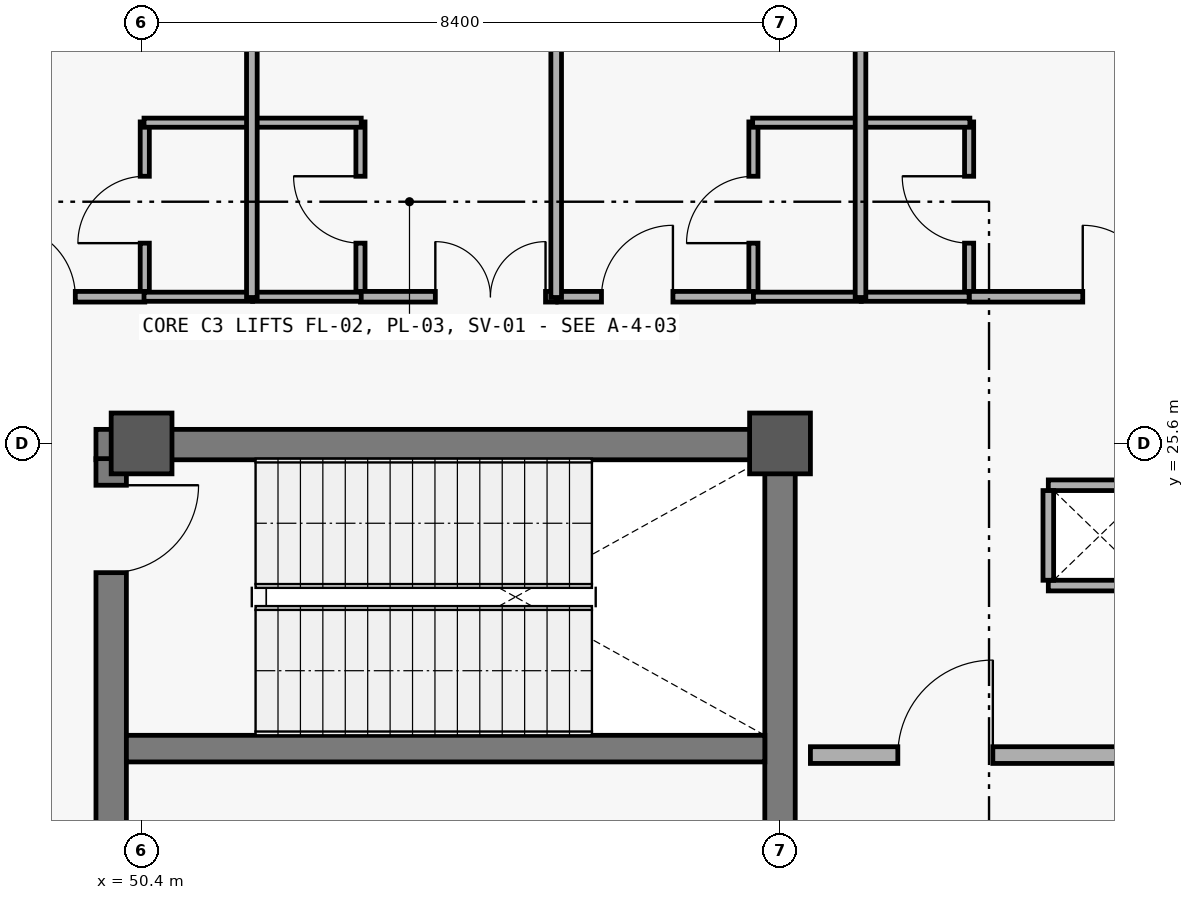
"""IFC4 building model, lengths in metres.
Left out: names, types, materials, properties, quantities, classifications, styles, units other than length and angle.
Written with IfcOpenShell. Run it as: python <this file> out.ifc"""

import sys

from ifc_helpers import new_model, si_unit, direction, frame, frame_2d, origin, origin_2d, place, context, subcontext, project, spatial, rectangle, extrude, element, fill, save


model = new_model("IFC4")
c1 = context("Model", 3, precision=1e-05, world=origin(), true_north=direction((0.0, 1.0)))
c2 = subcontext(c1, "Body", "Model", "MODEL_VIEW")
j1 = project(units=[si_unit("LENGTHUNIT", "METRE"), si_unit("PLANEANGLEUNIT", "RADIAN")], contexts=[c1])
p1 = place(None, origin())
s1 = spatial("IfcSite", under=j1, at=p1, CompositionType="ELEMENT")
p2 = place(p1, origin())
s2 = spatial("IfcBuilding", under=s1, at=p2, CompositionType="ELEMENT")
p3 = place(p2, frame((0.0, 0.0, 5.4)))
s3 = spatial("IfcBuildingStorey", under=s2, at=p3, CompositionType="ELEMENT", Elevation=5.4)
for number, where, z_axis, x_axis in (
    (1, (50.4, 25.6, 0.0), (0.0, 0.0, 1.0), (1.0, 0.0, 0.0)),
    (2, (58.8, 25.6, 0.0), (0.0, 0.0, 1.0), (1.0, 0.0, 0.0)),
):
    element("IfcColumn", number, at=place(p3, frame(where, z_axis=z_axis, x_axis=x_axis)), inside=s3, PredefinedType="COLUMN", context=c2, shape_type="SweptSolid", body=[
        extrude(rectangle(XDim=0.8, YDim=0.8, at=origin_2d()), origin(), (0.0, 0.0, 1.0), 5.4),
    ])
p4 = place(p3, frame((59.0, 25.585, 0.0), z_axis=(0.0, 0.0, 1.0), x_axis=(-1.0, 0.0, 0.0)))
e3 = element("IfcWall", 3, at=p4, inside=s3, PredefinedType="SHEAR", context=c2, shape_type="SweptSolid", body=[
    extrude(rectangle(XDim=9.2, YDim=0.4, at=frame_2d((4.6, 0.0))), origin(), (0.0, 0.0, 1.0), 5.08),
])
p5 = place(p3, frame((50.0, 25.4, 0.0), z_axis=(0.0, 0.0, 1.0), x_axis=(0.0, -1.0, 0.0)))
e4 = element("IfcWall", 4, at=p5, inside=s3, PredefinedType="SHEAR", context=c2, shape_type="SweptSolid", body=[
    extrude(rectangle(XDim=7.4, YDim=0.4, at=frame_2d((3.7, 0.0))), origin(), (0.0, 0.0, 1.0), 5.08),
])
p6 = place(p5, frame((0.35, 0.0, 0.0)))
e5 = element("IfcOpeningElement", 5, at=p6, cuts=e4, PredefinedType="OPENING", context=c2, shape_type="SweptSolid", body=[
    extrude(rectangle(XDim=1.15, YDim=2.2, at=frame_2d((0.575, 1.1))), frame((0.0, 0.21, 0.0), z_axis=(0.0, -1.0, 0.0), x_axis=(1.0, 0.0, 0.0)), (0.0, 0.0, 1.0), 0.42),
])
p7 = place(p3, frame((58.8, 18.0, 0.0), z_axis=(0.0, 0.0, 1.0), x_axis=(0.0, 1.0, 0.0)))
e6 = element("IfcWall", 6, at=p7, inside=s3, PredefinedType="SHEAR", context=c2, shape_type="SweptSolid", body=[
    extrude(rectangle(XDim=7.4, YDim=0.4, at=frame_2d((3.7, 0.0))), origin(), (0.0, 0.0, 1.0), 5.08),
])
p8 = place(p3, frame((50.2, 21.585, 0.0), z_axis=(0.0, 0.0, 1.0), x_axis=(1.0, 0.0, 0.0)))
e7 = element("IfcWall", 7, at=p8, inside=s3, PredefinedType="SHEAR", context=c2, shape_type="SweptSolid", body=[
    extrude(rectangle(XDim=8.4, YDim=0.35, at=frame_2d((4.2, 0.0))), origin(), (0.0, 0.0, 1.0), 5.08),
])
p9 = place(p3, frame((59.2, 21.5, 0.0), z_axis=(0.0, 0.0, 1.0), x_axis=(1.0, 0.0, 0.0)))
e8 = element("IfcWall", 8, at=p9, inside=s3, PredefinedType="SOLIDWALL", context=c2, shape_type="SweptSolid", body=[
    extrude(rectangle(XDim=4.8, YDim=0.22, at=frame_2d((2.4, 0.0))), origin(), (0.0, 0.0, 1.0), 4.23),
])
p10 = place(p9, frame((1.15, 0.0, 0.0)))
e9 = element("IfcOpeningElement", 9, at=p10, cuts=e8, PredefinedType="OPENING", context=c2, shape_type="SweptSolid", body=[
    extrude(rectangle(XDim=1.25, YDim=2.2, at=frame_2d((0.625, 1.1))), frame((0.0, 0.12, 0.0), z_axis=(0.0, -1.0, 0.0), x_axis=(1.0, 0.0, 0.0)), (0.0, 0.0, 1.0), 0.24),
])
p11 = place(p3, frame((50.442, 27.52, 0.0), z_axis=(0.0, 0.0, 1.0), x_axis=(0.0, 1.0, 0.0)))
e10 = element("IfcWall", 10, at=p11, inside=s3, PredefinedType="PARTITIONING", context=c2, shape_type="SweptSolid", body=[
    extrude(rectangle(XDim=2.31, YDim=0.12, at=frame_2d((1.155, 0.0))), origin(), (0.0, 0.0, 1.0), 4.18),
])
p12 = place(p11, frame((0.715, 0.0, 0.0)))
e11 = element("IfcOpeningElement", 11, at=p12, cuts=e10, PredefinedType="OPENING", context=c2, shape_type="SweptSolid", body=[
    extrude(rectangle(XDim=0.88, YDim=2.15, at=frame_2d((0.44, 1.075))), frame((0.0, 0.07, 0.0), z_axis=(0.0, -1.0, 0.0), x_axis=(1.0, 0.0, 0.0)), (0.0, 0.0, 1.0), 0.14),
])
p13 = place(p3, frame((53.28, 27.52, 0.0), z_axis=(0.0, 0.0, 1.0), x_axis=(0.0, 1.0, 0.0)))
e12 = element("IfcWall", 12, at=p13, inside=s3, PredefinedType="PARTITIONING", context=c2, shape_type="SweptSolid", body=[
    extrude(rectangle(XDim=2.31, YDim=0.12, at=frame_2d((1.155, 0.0))), origin(), (0.0, 0.0, 1.0), 4.18),
])
p14 = place(p13, frame((0.715, 0.0, 0.0)))
e13 = element("IfcOpeningElement", 13, at=p14, cuts=e12, PredefinedType="OPENING", context=c2, shape_type="SweptSolid", body=[
    extrude(rectangle(XDim=0.88, YDim=2.15, at=frame_2d((0.44, 1.075))), frame((0.0, 0.07, 0.0), z_axis=(0.0, -1.0, 0.0), x_axis=(1.0, 0.0, 0.0)), (0.0, 0.0, 1.0), 0.14),
])
p15 = place(p3, frame((58.45, 27.52, 0.0), z_axis=(0.0, 0.0, 1.0), x_axis=(0.0, 1.0, 0.0)))
e14 = element("IfcWall", 14, at=p15, inside=s3, PredefinedType="PARTITIONING", context=c2, shape_type="SweptSolid", body=[
    extrude(rectangle(XDim=2.31, YDim=0.12, at=frame_2d((1.155, 0.0))), origin(), (0.0, 0.0, 1.0), 4.18),
])
p16 = place(p15, frame((0.715, 0.0, 0.0)))
e15 = element("IfcOpeningElement", 15, at=p16, cuts=e14, PredefinedType="OPENING", context=c2, shape_type="SweptSolid", body=[
    extrude(rectangle(XDim=0.88, YDim=2.15, at=frame_2d((0.44, 1.075))), frame((0.0, 0.07, 0.0), z_axis=(0.0, -1.0, 0.0), x_axis=(1.0, 0.0, 0.0)), (0.0, 0.0, 1.0), 0.14),
])
p17 = place(p3, frame((61.288, 27.52, 0.0), z_axis=(0.0, 0.0, 1.0), x_axis=(0.0, 1.0, 0.0)))
e16 = element("IfcWall", 16, at=p17, inside=s3, PredefinedType="PARTITIONING", context=c2, shape_type="SweptSolid", body=[
    extrude(rectangle(XDim=2.31, YDim=0.12, at=frame_2d((1.155, 0.0))), origin(), (0.0, 0.0, 1.0), 4.18),
])
p18 = place(p17, frame((0.715, 0.0, 0.0)))
e17 = element("IfcOpeningElement", 17, at=p18, cuts=e16, PredefinedType="OPENING", context=c2, shape_type="SweptSolid", body=[
    extrude(rectangle(XDim=0.88, YDim=2.15, at=frame_2d((0.44, 1.075))), frame((0.0, 0.07, 0.0), z_axis=(0.0, -1.0, 0.0), x_axis=(1.0, 0.0, 0.0)), (0.0, 0.0, 1.0), 0.14),
])
p19 = place(p3, frame((47.867, 27.53, 0.0), z_axis=(0.0, 0.0, 1.0), x_axis=(1.0, 0.0, 0.0)))
e18 = element("IfcWall", 18, at=p19, inside=s3, PredefinedType="PARTITIONING", context=c2, shape_type="SweptSolid", body=[
    extrude(rectangle(XDim=2.575, YDim=0.14, at=frame_2d((1.288, 0.0))), origin(), (0.0, 0.0, 1.0), 4.18),
])
p20 = place(p19, frame((0.721, 0.0, 0.0)))
e19 = element("IfcOpeningElement", 19, at=p20, cuts=e18, PredefinedType="OPENING", context=c2, shape_type="SweptSolid", body=[
    extrude(rectangle(XDim=0.94, YDim=2.2, at=frame_2d((0.47, 1.1))), frame((0.0, 0.08, 0.0), z_axis=(0.0, -1.0, 0.0), x_axis=(1.0, 0.0, 0.0)), (0.0, 0.0, 1.0), 0.16),
])
p21 = place(p3, frame((53.28, 27.53, 0.0), z_axis=(0.0, 0.0, 1.0), x_axis=(1.0, 0.0, 0.0)))
e20 = element("IfcWall", 20, at=p21, inside=s3, PredefinedType="PARTITIONING", context=c2, shape_type="SweptSolid", body=[
    extrude(rectangle(XDim=2.575, YDim=0.14, at=frame_2d((1.288, 0.0))), origin(), (0.0, 0.0, 1.0), 4.18),
])
p22 = place(p21, frame((0.985, 0.0, 0.0)))
e21 = element("IfcOpeningElement", 21, at=p22, cuts=e20, PredefinedType="OPENING", context=c2, shape_type="SweptSolid", body=[
    extrude(rectangle(XDim=1.45, YDim=2.3, at=frame_2d((0.725, 1.15))), frame((0.0, 0.08, 0.0), z_axis=(0.0, -1.0, 0.0), x_axis=(1.0, 0.0, 0.0)), (0.0, 0.0, 1.0), 0.16),
])
p23 = place(p3, frame((55.875, 27.53, 0.0), z_axis=(0.0, 0.0, 1.0), x_axis=(1.0, 0.0, 0.0)))
e22 = element("IfcWall", 22, at=p23, inside=s3, PredefinedType="PARTITIONING", context=c2, shape_type="SweptSolid", body=[
    extrude(rectangle(XDim=2.575, YDim=0.14, at=frame_2d((1.288, 0.0))), origin(), (0.0, 0.0, 1.0), 4.18),
])
p24 = place(p23, frame((0.576, 0.0, 0.0)))
e23 = element("IfcOpeningElement", 23, at=p24, cuts=e22, PredefinedType="OPENING", context=c2, shape_type="SweptSolid", body=[
    extrude(rectangle(XDim=0.94, YDim=2.2, at=frame_2d((0.47, 1.1))), frame((0.0, 0.08, 0.0), z_axis=(0.0, -1.0, 0.0), x_axis=(1.0, 0.0, 0.0)), (0.0, 0.0, 1.0), 0.16),
])
p25 = place(p3, frame((61.288, 27.53, 0.0), z_axis=(0.0, 0.0, 1.0), x_axis=(1.0, 0.0, 0.0)))
e24 = element("IfcWall", 24, at=p25, inside=s3, PredefinedType="PARTITIONING", context=c2, shape_type="SweptSolid", body=[
    extrude(rectangle(XDim=2.575, YDim=0.14, at=frame_2d((1.288, 0.0))), origin(), (0.0, 0.0, 1.0), 4.18),
])
p26 = place(p25, frame((1.495, 0.0, 0.0)))
e25 = element("IfcOpeningElement", 25, at=p26, cuts=e24, PredefinedType="OPENING", context=c2, shape_type="SweptSolid", body=[
    extrude(rectangle(XDim=0.94, YDim=2.2, at=frame_2d((0.47, 1.1))), frame((0.0, 0.08, 0.0), z_axis=(0.0, -1.0, 0.0), x_axis=(1.0, 0.0, 0.0)), (0.0, 0.0, 1.0), 0.16),
])
for number, where, z_axis, x_axis in (
    (26, (50.432, 27.53, 0.0), (0.0, 0.0, 1.0), (1.0, 0.0, 0.0)),
    (27, (50.432, 29.82, 0.0), (0.0, 0.0, 1.0), (1.0, 0.0, 0.0)),
):
    element("IfcWall", number, at=place(p3, frame(where, z_axis=z_axis, x_axis=x_axis)), inside=s3, PredefinedType="PARTITIONING", context=c2, shape_type="SweptSolid", body=[
        extrude(rectangle(XDim=1.429, YDim=0.12, at=frame_2d((0.715, 0.0))), origin(), (0.0, 0.0, 1.0), 4.18),
    ])
for number, where, z_axis, x_axis in (
    (28, (51.861, 27.53, 0.0), (0.0, 0.0, 1.0), (1.0, 0.0, 0.0)),
    (29, (51.861, 29.82, 0.0), (0.0, 0.0, 1.0), (1.0, 0.0, 0.0)),
):
    element("IfcWall", number, at=place(p3, frame(where, z_axis=z_axis, x_axis=x_axis)), inside=s3, PredefinedType="PARTITIONING", context=c2, shape_type="SweptSolid", body=[
        extrude(rectangle(XDim=1.429, YDim=0.12, at=frame_2d((0.714, 0.0))), origin(), (0.0, 0.0, 1.0), 4.18),
    ])
p27 = place(p3, frame((58.45, 27.53, 0.0), z_axis=(0.0, 0.0, 1.0), x_axis=(1.0, 0.0, 0.0)))
e30 = element("IfcWall", 30, at=p27, inside=s3, PredefinedType="PARTITIONING", context=c2, shape_type="SweptSolid", body=[
    extrude(rectangle(XDim=1.419, YDim=0.12, at=frame_2d((0.709, 0.0))), origin(), (0.0, 0.0, 1.0), 4.18),
])
p28 = place(p3, frame((58.44, 29.82, 0.0), z_axis=(0.0, 0.0, 1.0), x_axis=(1.0, 0.0, 0.0)))
e31 = element("IfcWall", 31, at=p28, inside=s3, PredefinedType="PARTITIONING", context=c2, shape_type="SweptSolid", body=[
    extrude(rectangle(XDim=1.429, YDim=0.12, at=frame_2d((0.714, 0.0))), origin(), (0.0, 0.0, 1.0), 4.18),
])
p29 = place(p3, frame((59.869, 27.53, 0.0), z_axis=(0.0, 0.0, 1.0), x_axis=(1.0, 0.0, 0.0)))
e32 = element("IfcWall", 32, at=p29, inside=s3, PredefinedType="PARTITIONING", context=c2, shape_type="SweptSolid", body=[
    extrude(rectangle(XDim=1.419, YDim=0.12, at=frame_2d((0.709, 0.0))), origin(), (0.0, 0.0, 1.0), 4.18),
])
p30 = place(p3, frame((59.869, 29.82, 0.0), z_axis=(0.0, 0.0, 1.0), x_axis=(1.0, 0.0, 0.0)))
e33 = element("IfcWall", 33, at=p30, inside=s3, PredefinedType="PARTITIONING", context=c2, shape_type="SweptSolid", body=[
    extrude(rectangle(XDim=1.429, YDim=0.12, at=frame_2d((0.715, 0.0))), origin(), (0.0, 0.0, 1.0), 4.18),
])
for number, where, z_axis, x_axis in (
    (34, (51.851, 27.52, 0.0), (0.0, 0.0, 1.0), (0.0, 1.0, 0.0)),
    (35, (55.855, 27.52, 0.0), (0.0, 0.0, 1.0), (0.0, 1.0, 0.0)),
    (36, (59.859, 27.52, 0.0), (0.0, 0.0, 1.0), (0.0, 1.0, 0.0)),
):
    element("IfcWall", number, at=place(p3, frame(where, z_axis=z_axis, x_axis=x_axis)), inside=s3, PredefinedType="PARTITIONING", context=c2, shape_type="SweptSolid", body=[
        extrude(rectangle(XDim=6.14, YDim=0.14, at=frame_2d((3.07, 0.0))), origin(), (0.0, 0.0, 1.0), 4.18),
    ])
for number, where, z_axis, x_axis in (
    (37, (62.33, 23.73, 0.0), (0.0, 0.0, 1.0), (1.0, 0.0, 0.0)),
    (38, (63.69, 25.05, 0.0), (0.0, 0.0, 1.0), (-1.0, 0.0, 0.0)),
):
    element("IfcWall", number, at=place(p3, frame(where, z_axis=z_axis, x_axis=x_axis)), inside=s3, PredefinedType="PARTITIONING", context=c2, shape_type="SweptSolid", body=[
        extrude(rectangle(XDim=1.36, YDim=0.14, at=frame_2d((0.68, 0.0))), origin(), (0.0, 0.0, 1.0), 4.2),
    ])
p31 = place(p3, frame((62.33, 24.98, 0.0), z_axis=(0.0, 0.0, 1.0), x_axis=(0.0, -1.0, 0.0)))
e39 = element("IfcWall", 39, at=p31, inside=s3, PredefinedType="PARTITIONING", context=c2, shape_type="SweptSolid", body=[
    extrude(rectangle(XDim=1.18, YDim=0.14, at=frame_2d((0.59, 0.0))), origin(), (0.0, 0.0, 1.0), 4.2),
])
p32 = place(p6, origin())
e40 = element("IfcDoor", 40, at=p32, inside=s3, OperationType="SINGLE_SWING_LEFT", PredefinedType="DOOR", context=c2, shape_type="SweptSolid", body=[
    extrude(rectangle(XDim=1.15, YDim=2.2, at=frame_2d((0.575, 1.1))), frame((0.0, 0.025, 0.0), z_axis=(0.0, -1.0, 0.0), x_axis=(1.0, 0.0, 0.0)), (0.0, 0.0, 1.0), 0.05),
])
fill(e5, e40)
p33 = place(p10, origin())
e41 = element("IfcDoor", 41, at=p33, inside=s3, OperationType="SINGLE_SWING_RIGHT", PredefinedType="DOOR", context=c2, shape_type="SweptSolid", body=[
    extrude(rectangle(XDim=1.25, YDim=2.2, at=frame_2d((0.625, 1.1))), frame((0.0, 0.025, 0.0), z_axis=(0.0, -1.0, 0.0), x_axis=(1.0, 0.0, 0.0)), (0.0, 0.0, 1.0), 0.05),
])
fill(e9, e41)
p34 = place(p12, origin())
e42 = element("IfcDoor", 42, at=p34, inside=s3, OperationType="SINGLE_SWING_LEFT", PredefinedType="DOOR", context=c2, shape_type="SweptSolid", body=[
    extrude(rectangle(XDim=0.88, YDim=2.15, at=frame_2d((0.44, 1.075))), frame((0.0, 0.025, 0.0), z_axis=(0.0, -1.0, 0.0), x_axis=(1.0, 0.0, 0.0)), (0.0, 0.0, 1.0), 0.05),
])
fill(e11, e42)
p35 = place(p14, origin())
e43 = element("IfcDoor", 43, at=p35, inside=s3, OperationType="SINGLE_SWING_RIGHT", PredefinedType="DOOR", context=c2, shape_type="SweptSolid", body=[
    extrude(rectangle(XDim=0.88, YDim=2.15, at=frame_2d((0.44, 1.075))), frame((0.0, 0.025, 0.0), z_axis=(0.0, -1.0, 0.0), x_axis=(1.0, 0.0, 0.0)), (0.0, 0.0, 1.0), 0.05),
])
fill(e13, e43)
p36 = place(p16, origin())
e44 = element("IfcDoor", 44, at=p36, inside=s3, OperationType="SINGLE_SWING_LEFT", PredefinedType="DOOR", context=c2, shape_type="SweptSolid", body=[
    extrude(rectangle(XDim=0.88, YDim=2.15, at=frame_2d((0.44, 1.075))), frame((0.0, 0.025, 0.0), z_axis=(0.0, -1.0, 0.0), x_axis=(1.0, 0.0, 0.0)), (0.0, 0.0, 1.0), 0.05),
])
fill(e15, e44)
p37 = place(p18, origin())
e45 = element("IfcDoor", 45, at=p37, inside=s3, OperationType="SINGLE_SWING_RIGHT", PredefinedType="DOOR", context=c2, shape_type="SweptSolid", body=[
    extrude(rectangle(XDim=0.88, YDim=2.15, at=frame_2d((0.44, 1.075))), frame((0.0, 0.025, 0.0), z_axis=(0.0, -1.0, 0.0), x_axis=(1.0, 0.0, 0.0)), (0.0, 0.0, 1.0), 0.05),
])
fill(e17, e45)
p38 = place(p20, origin())
e46 = element("IfcDoor", 46, at=p38, inside=s3, OperationType="SINGLE_SWING_LEFT", PredefinedType="DOOR", context=c2, shape_type="SweptSolid", body=[
    extrude(rectangle(XDim=0.94, YDim=2.2, at=frame_2d((0.47, 1.1))), frame((0.0, 0.025, 0.0), z_axis=(0.0, -1.0, 0.0), x_axis=(1.0, 0.0, 0.0)), (0.0, 0.0, 1.0), 0.05),
])
fill(e19, e46)
p39 = place(p22, origin())
e47 = element("IfcDoor", 47, at=p39, inside=s3, OperationType="DOUBLE_DOOR_SINGLE_SWING", PredefinedType="DOOR", context=c2, shape_type="SweptSolid", body=[
    extrude(rectangle(XDim=1.45, YDim=2.3, at=frame_2d((0.725, 1.15))), frame((0.0, 0.025, 0.0), z_axis=(0.0, -1.0, 0.0), x_axis=(1.0, 0.0, 0.0)), (0.0, 0.0, 1.0), 0.05),
])
fill(e21, e47)
p40 = place(p24, origin())
e48 = element("IfcDoor", 48, at=p40, inside=s3, OperationType="SINGLE_SWING_RIGHT", PredefinedType="DOOR", context=c2, shape_type="SweptSolid", body=[
    extrude(rectangle(XDim=0.94, YDim=2.2, at=frame_2d((0.47, 1.1))), frame((0.0, 0.025, 0.0), z_axis=(0.0, -1.0, 0.0), x_axis=(1.0, 0.0, 0.0)), (0.0, 0.0, 1.0), 0.05),
])
fill(e23, e48)
p41 = place(p26, origin())
e49 = element("IfcDoor", 49, at=p41, inside=s3, OperationType="SINGLE_SWING_LEFT", PredefinedType="DOOR", context=c2, shape_type="SweptSolid", body=[
    extrude(rectangle(XDim=0.94, YDim=2.2, at=frame_2d((0.47, 1.1))), frame((0.0, 0.025, 0.0), z_axis=(0.0, -1.0, 0.0), x_axis=(1.0, 0.0, 0.0)), (0.0, 0.0, 1.0), 0.05),
])
fill(e25, e49)
save(model, sys.argv[1])
